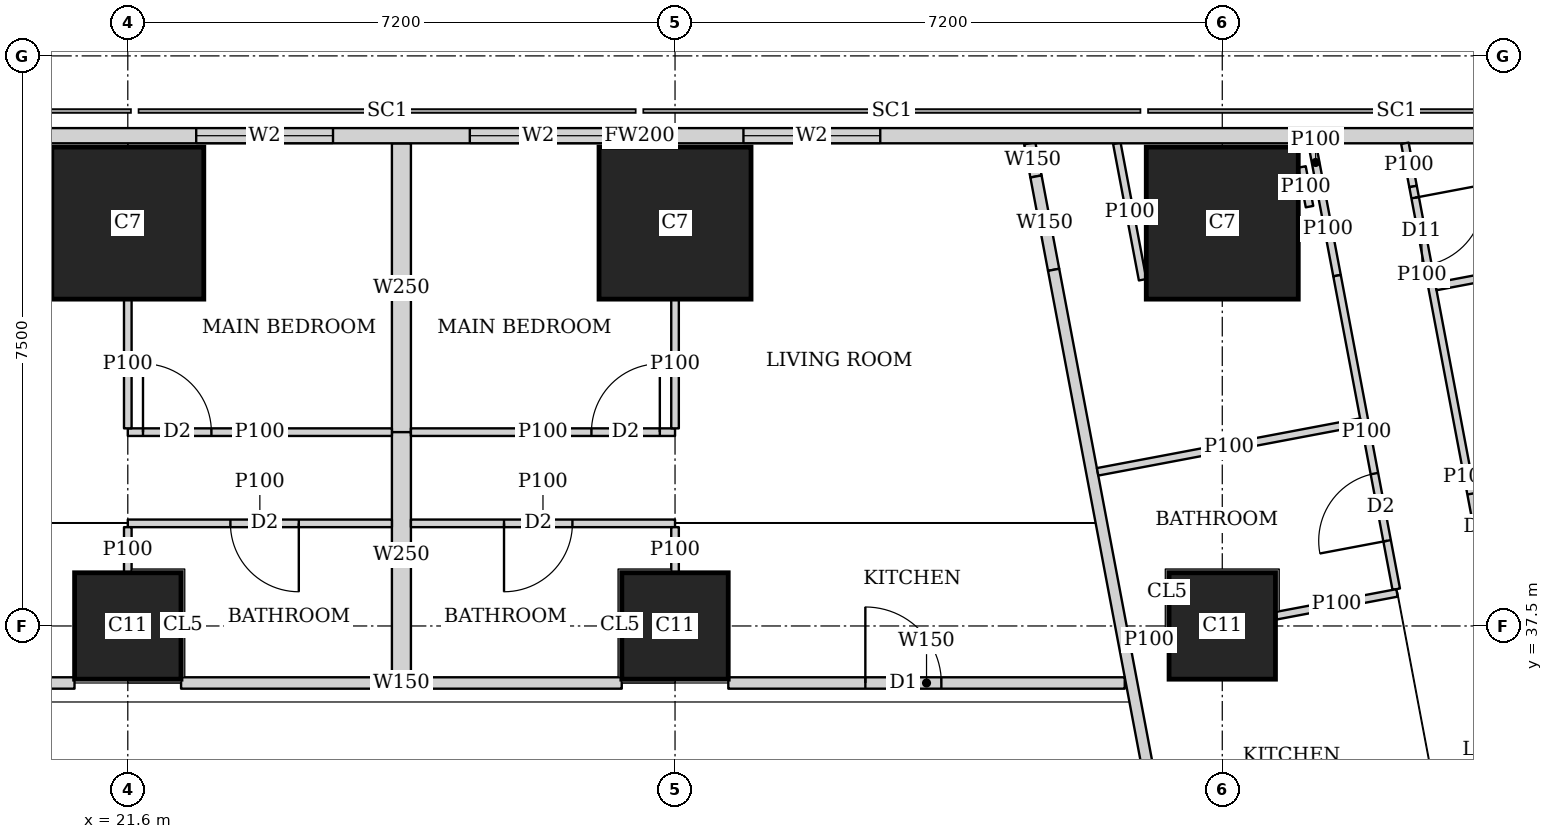
"""IFC4 building model, lengths in metres.
Left out: names, types, materials, properties, quantities, classifications, styles, units other than length and angle.
Written with IfcOpenShell. Run it as: python <this file> out.ifc"""

import sys

from ifc_helpers import new_model, si_unit, direction, frame, frame_2d, origin, origin_2d, place, context, subcontext, project, spatial, rectangle, extrude, element, fill, save


model = new_model("IFC4")
c1 = context("Model", 3, precision=1e-05, world=origin(), true_north=direction((0.0, 1.0)))
c2 = subcontext(c1, "Body", "Model", "MODEL_VIEW")
j1 = project(units=[si_unit("LENGTHUNIT", "METRE"), si_unit("PLANEANGLEUNIT", "RADIAN")], contexts=[c1])
p1 = place(None, origin())
s1 = spatial("IfcSite", under=j1, at=p1, CompositionType="ELEMENT")
p2 = place(p1, origin())
s2 = spatial("IfcBuilding", under=s1, at=p2, CompositionType="ELEMENT")
p3 = place(p2, frame((0.0, 0.0, 259.1)))
s3 = spatial("IfcBuildingStorey", under=s2, at=p3, CompositionType="ELEMENT", Elevation=259.1)
for number, where, z_axis, x_axis in (
    (1, (21.6, 37.5, 0.0), (0.0, 0.0, 1.0), (1.0, 0.0, 0.0)),
    (2, (28.8, 37.5, 0.0), (0.0, 0.0, 1.0), (1.0, 0.0, 0.0)),
    (3, (36.0, 37.5, 0.0), (0.0, 0.0, 1.0), (1.0, 0.0, 0.0)),
):
    element("IfcColumn", number, at=place(p3, frame(where, z_axis=z_axis, x_axis=x_axis)), inside=s3, PredefinedType="COLUMN", context=c2, shape_type="SweptSolid", body=[
        extrude(rectangle(XDim=1.4, YDim=1.4, at=origin_2d()), origin(), (0.0, 0.0, 1.0), 3.75),
    ])
for number, where, z_axis, x_axis in (
    (4, (21.6, 42.8, 0.0), (0.0, 0.0, 1.0), (1.0, 0.0, 0.0)),
    (5, (28.8, 42.8, 0.0), (0.0, 0.0, 1.0), (1.0, 0.0, 0.0)),
    (6, (36.0, 42.8, 0.0), (0.0, 0.0, 1.0), (1.0, 0.0, 0.0)),
):
    element("IfcColumn", number, at=place(p3, frame(where, z_axis=z_axis, x_axis=x_axis)), inside=s3, PredefinedType="COLUMN", context=c2, shape_type="SweptSolid", body=[
        extrude(rectangle(XDim=2.0, YDim=2.0, at=origin_2d()), origin(), (0.0, 0.0, 1.0), 3.75),
    ])
p4 = place(p3, frame((42.103, 43.95, 0.0), z_axis=(0.0, 0.0, 1.0), x_axis=(-1.0, 0.0, 0.0)))
e7 = element("IfcWall", 7, at=p4, inside=s3, PredefinedType="SOLIDWALL", context=c2, shape_type="SweptSolid", body=[
    extrude(rectangle(XDim=27.54, YDim=0.2, at=frame_2d((13.77, 0.0))), origin(), (0.0, 0.0, 1.0), 3.5),
])
p5 = place(p4, frame((10.603, 0.0, 0.9)))
e8 = element("IfcOpeningElement", 8, at=p5, cuts=e7, PredefinedType="OPENING", context=c2, shape_type="SweptSolid", body=[
    extrude(rectangle(XDim=1.8, YDim=1.5, at=frame_2d((0.9, 0.75))), frame((0.0, 0.11, 0.0), z_axis=(0.0, -1.0, 0.0), x_axis=(1.0, 0.0, 0.0)), (0.0, 0.0, 1.0), 0.22),
])
p6 = place(p4, frame((14.203, 0.0, 0.9)))
e9 = element("IfcOpeningElement", 9, at=p6, cuts=e7, PredefinedType="OPENING", context=c2, shape_type="SweptSolid", body=[
    extrude(rectangle(XDim=1.8, YDim=1.5, at=frame_2d((0.9, 0.75))), frame((0.0, 0.11, 0.0), z_axis=(0.0, -1.0, 0.0), x_axis=(1.0, 0.0, 0.0)), (0.0, 0.0, 1.0), 0.22),
])
p7 = place(p4, frame((17.803, 0.0, 0.9)))
e10 = element("IfcOpeningElement", 10, at=p7, cuts=e7, PredefinedType="OPENING", context=c2, shape_type="SweptSolid", body=[
    extrude(rectangle(XDim=1.8, YDim=1.5, at=frame_2d((0.9, 0.75))), frame((0.0, 0.11, 0.0), z_axis=(0.0, -1.0, 0.0), x_axis=(1.0, 0.0, 0.0)), (0.0, 0.0, 1.0), 0.22),
])
p8 = place(p4, frame((22.822, 0.0, 0.9)))
e11 = element("IfcOpeningElement", 11, at=p8, cuts=e7, PredefinedType="OPENING", context=c2, shape_type="SweptSolid", body=[
    extrude(rectangle(XDim=2.4, YDim=1.5, at=frame_2d((1.2, 0.75))), frame((0.0, 0.11, 0.0), z_axis=(0.0, -1.0, 0.0), x_axis=(1.0, 0.0, 0.0)), (0.0, 0.0, 1.0), 0.22),
])
p9 = place(p3, frame((16.001, 36.75, 0.0), z_axis=(0.0, 0.0, 1.0), x_axis=(1.0, 0.0, 0.0)))
e12 = element("IfcWall", 12, at=p9, inside=s3, PredefinedType="SOLIDWALL", context=c2, shape_type="SweptSolid", body=[
    extrude(rectangle(XDim=4.898, YDim=0.15, at=frame_2d((2.449, 0.0))), origin(), (0.0, 0.0, 1.0), 3.5),
])
p10 = place(p9, frame((1.074, 0.0, 0.0)))
e13 = element("IfcOpeningElement", 13, at=p10, cuts=e12, PredefinedType="OPENING", context=c2, shape_type="SweptSolid", body=[
    extrude(rectangle(XDim=1.0, YDim=2.1, at=frame_2d((0.5, 1.05))), frame((0.0, 0.085, 0.0), z_axis=(0.0, -1.0, 0.0), x_axis=(1.0, 0.0, 0.0)), (0.0, 0.0, 1.0), 0.17),
])
p11 = place(p3, frame((22.301, 36.75, 0.0), z_axis=(0.0, 0.0, 1.0), x_axis=(1.0, 0.0, 0.0)))
e14 = element("IfcWall", 14, at=p11, inside=s3, PredefinedType="SOLIDWALL", context=c2, shape_type="SweptSolid", body=[
    extrude(rectangle(XDim=5.798, YDim=0.15, at=frame_2d((2.899, 0.0))), origin(), (0.0, 0.0, 1.0), 3.5),
])
p12 = place(p3, frame((29.501, 36.75, 0.0), z_axis=(0.0, 0.0, 1.0), x_axis=(1.0, 0.0, 0.0)))
e15 = element("IfcWall", 15, at=p12, inside=s3, PredefinedType="SOLIDWALL", context=c2, shape_type="SweptSolid", body=[
    extrude(rectangle(XDim=5.216, YDim=0.15, at=frame_2d((2.608, 0.0))), origin(), (0.0, 0.0, 1.0), 3.5),
])
p13 = place(p12, frame((1.803, 0.0, 0.0)))
e16 = element("IfcOpeningElement", 16, at=p13, cuts=e15, PredefinedType="OPENING", context=c2, shape_type="SweptSolid", body=[
    extrude(rectangle(XDim=1.0, YDim=2.1, at=frame_2d((0.5, 1.05))), frame((0.0, 0.085, 0.0), z_axis=(0.0, -1.0, 0.0), x_axis=(1.0, 0.0, 0.0)), (0.0, 0.0, 1.0), 0.17),
])
p14 = place(p3, frame((33.467, 43.85, 0.0), z_axis=(0.0, 0.0, 1.0), x_axis=(0.184886516626, -0.982759877066, 0.0)))
e17 = element("IfcWall", 17, at=p14, inside=s3, PredefinedType="SOLIDWALL", context=c2, shape_type="SweptSolid", body=[
    extrude(rectangle(XDim=0.444, YDim=0.15, at=frame_2d((0.222, 0.0))), origin(), (0.0, 0.0, 1.0), 3.5),
])
p15 = place(p3, frame((33.549, 43.414, 0.0), z_axis=(0.0, 0.0, 1.0), x_axis=(0.185585816539, -0.982628060204, 0.0)))
e18 = element("IfcWall", 18, at=p15, inside=s3, PredefinedType="SOLIDWALL", context=c2, shape_type="SweptSolid", body=[
    extrude(rectangle(XDim=1.25, YDim=0.15, at=frame_2d((0.625, 0.0))), origin(), (0.0, 0.0, 1.0), 2.05),
])
p16 = place(p3, frame((33.781, 42.186, 0.0), z_axis=(0.0, 0.0, 1.0), x_axis=(0.185593518645, -0.9826266055, 0.0)))
e19 = element("IfcWall", 19, at=p16, inside=s3, PredefinedType="SOLIDWALL", context=c2, shape_type="SweptSolid", body=[
    extrude(rectangle(XDim=35.961, YDim=0.15, at=frame_2d((17.98, 0.0))), origin(), (0.0, 0.0, 1.0), 2.5),
])
p17 = place(p16, frame((7.183, 0.0, 0.0)))
e20 = element("IfcOpeningElement", 20, at=p17, cuts=e19, PredefinedType="OPENING", context=c2, shape_type="SweptSolid", body=[
    extrude(rectangle(XDim=1.0, YDim=2.1, at=frame_2d((0.5, 1.05))), frame((0.0, 0.085, 0.0), z_axis=(0.0, -1.0, 0.0), x_axis=(1.0, 0.0, 0.0)), (0.0, 0.0, 1.0), 0.17),
])
p18 = place(p16, frame((11.76, 0.0, 0.0)))
e21 = element("IfcOpeningElement", 21, at=p18, cuts=e19, PredefinedType="OPENING", context=c2, shape_type="SweptSolid", body=[
    extrude(rectangle(XDim=1.0, YDim=2.1, at=frame_2d((0.5, 1.05))), frame((0.0, 0.085, 0.0), z_axis=(0.0, -1.0, 0.0), x_axis=(1.0, 0.0, 0.0)), (0.0, 0.0, 1.0), 0.17),
])
p19 = place(p16, frame((23.863, 0.0, 0.0)))
e22 = element("IfcOpeningElement", 22, at=p19, cuts=e19, PredefinedType="OPENING", context=c2, shape_type="SweptSolid", body=[
    extrude(rectangle(XDim=1.0, YDim=2.1, at=frame_2d((0.5, 1.05))), frame((0.0, 0.085, 0.0), z_axis=(0.0, -1.0, 0.0), x_axis=(1.0, 0.0, 0.0)), (0.0, 0.0, 1.0), 0.17),
])
p20 = place(p16, frame((30.502, 0.0, 0.0)))
e23 = element("IfcOpeningElement", 23, at=p20, cuts=e19, PredefinedType="OPENING", context=c2, shape_type="SweptSolid", body=[
    extrude(rectangle(XDim=1.0, YDim=2.1, at=frame_2d((0.5, 1.05))), frame((0.0, 0.085, 0.0), z_axis=(0.0, -1.0, 0.0), x_axis=(1.0, 0.0, 0.0)), (0.0, 0.0, 1.0), 0.17),
])
p21 = place(p3, frame((34.952, 42.055, 0.0), z_axis=(0.0, 0.0, 1.0), x_axis=(-0.185490642006, 0.98264603074, 0.0)))
e24 = element("IfcWall", 24, at=p21, inside=s3, PredefinedType="PARTITIONING", context=c2, shape_type="SweptSolid", body=[
    extrude(rectangle(XDim=1.827, YDim=0.1, at=frame_2d((0.914, 0.0))), origin(), (0.0, 0.0, 1.0), 2.05),
])
p22 = place(p3, frame((37.049, 43.539, 0.0), z_axis=(0.0, 0.0, 1.0), x_axis=(0.186119495745, -0.982527115811, 0.0)))
e25 = element("IfcWall", 25, at=p22, inside=s3, PredefinedType="PARTITIONING", context=c2, shape_type="SweptSolid", body=[
    extrude(rectangle(XDim=0.531, YDim=0.1, at=frame_2d((0.266, 0.0))), origin(), (0.0, 0.0, 1.0), 2.05),
])
p23 = place(p3, frame((38.403, 43.85, 0.0), z_axis=(0.0, 0.0, 1.0), x_axis=(0.184976954078, -0.982742858768, 0.0)))
e26 = element("IfcWall", 26, at=p23, inside=s3, PredefinedType="PARTITIONING", context=c2, shape_type="SweptSolid", body=[
    extrude(rectangle(XDim=0.578, YDim=0.1, at=frame_2d((0.289, 0.0))), origin(), (0.0, 0.0, 1.0), 3.5),
])
p24 = place(p3, frame((38.51, 43.282, 0.0), z_axis=(0.0, 0.0, 1.0), x_axis=(0.185775287495, -0.982592256511, 0.0)))
e27 = element("IfcWall", 27, at=p24, inside=s3, PredefinedType="PARTITIONING", context=c2, shape_type="SweptSolid", body=[
    extrude(rectangle(XDim=1.259, YDim=0.1, at=frame_2d((0.629, 0.0))), origin(), (0.0, 0.0, 1.0), 2.05),
])
p25 = place(p24, frame((0.15, 0.0, 0.0)))
e28 = element("IfcOpeningElement", 28, at=p25, cuts=e27, PredefinedType="OPENING", context=c2, shape_type="SweptSolid", body=[
    extrude(rectangle(XDim=0.9, YDim=2.0, at=frame_2d((0.45, 1.0))), frame((0.0, 0.06, 0.0), z_axis=(0.0, -1.0, 0.0), x_axis=(1.0, 0.0, 0.0)), (0.0, 0.0, 1.0), 0.12),
])
p26 = place(p3, frame((38.744, 42.045, 0.0), z_axis=(0.0, 0.0, 1.0), x_axis=(0.185564988614, -0.982631993679, 0.0)))
e29 = element("IfcWall", 29, at=p26, inside=s3, PredefinedType="PARTITIONING", context=c2, shape_type="SweptSolid", body=[
    extrude(rectangle(XDim=5.265, YDim=0.1, at=frame_2d((2.633, 0.0))), origin(), (0.0, 0.0, 1.0), 3.5),
])
p27 = place(p26, frame((2.856, 0.0, 0.0)))
e30 = element("IfcOpeningElement", 30, at=p27, cuts=e29, PredefinedType="OPENING", context=c2, shape_type="SweptSolid", body=[
    extrude(rectangle(XDim=0.9, YDim=2.1, at=frame_2d((0.45, 1.05))), frame((0.0, 0.06, 0.0), z_axis=(0.0, -1.0, 0.0), x_axis=(1.0, 0.0, 0.0)), (0.0, 0.0, 1.0), 0.12),
])
p28 = place(p3, frame((37.181, 43.85, 0.0), z_axis=(0.0, 0.0, 1.0), x_axis=(0.185121727606, -0.982715597703, 0.0)))
e31 = element("IfcWall", 31, at=p28, inside=s3, PredefinedType="PARTITIONING", context=c2, shape_type="SweptSolid", body=[
    extrude(rectangle(XDim=0.513, YDim=0.1, at=frame_2d((0.256, 0.0))), origin(), (0.0, 0.0, 1.0), 3.5),
])
p29 = place(p3, frame((37.276, 43.346, 0.0), z_axis=(0.0, 0.0, 1.0), x_axis=(0.185962504646, -0.982556841544, 0.0)))
e32 = element("IfcWall", 32, at=p29, inside=s3, PredefinedType="PARTITIONING", context=c2, shape_type="SweptSolid", body=[
    extrude(rectangle(XDim=1.259, YDim=0.1, at=frame_2d((0.629, 0.0))), origin(), (0.0, 0.0, 1.0), 2.05),
])
p30 = place(p3, frame((37.51, 42.109, 0.0), z_axis=(0.0, 0.0, 1.0), x_axis=(0.185580569503, -0.98262905118, 0.0)))
e33 = element("IfcWall", 33, at=p30, inside=s3, PredefinedType="PARTITIONING", context=c2, shape_type="SweptSolid", body=[
    extrude(rectangle(XDim=4.198, YDim=0.1, at=frame_2d((2.099, 0.0))), origin(), (0.0, 0.0, 1.0), 3.5),
])
p31 = place(p30, frame((2.65, 0.0, 0.0)))
e34 = element("IfcOpeningElement", 34, at=p31, cuts=e33, PredefinedType="OPENING", context=c2, shape_type="SweptSolid", body=[
    extrude(rectangle(XDim=0.9, YDim=2.1, at=frame_2d((0.45, 1.05))), frame((0.0, 0.06, 0.0), z_axis=(0.0, -1.0, 0.0), x_axis=(1.0, 0.0, 0.0)), (0.0, 0.0, 1.0), 0.12),
])
p32 = place(p3, frame((40.657, 42.315, 0.0), z_axis=(0.0, 0.0, 1.0), x_axis=(-0.982622785543, -0.185613742305, 0.0)))
e35 = element("IfcWall", 35, at=p32, inside=s3, PredefinedType="PARTITIONING", context=c2, shape_type="SweptSolid", body=[
    extrude(rectangle(XDim=1.88, YDim=0.1, at=frame_2d((0.94, 0.0))), origin(), (0.0, 0.0, 1.0), 2.05),
])
p33 = place(p3, frame((37.823, 40.182, 0.0), z_axis=(0.0, 0.0, 1.0), x_axis=(-0.98263926043, -0.185526504472, 0.0)))
e36 = element("IfcWall", 36, at=p33, inside=s3, PredefinedType="PARTITIONING", context=c2, shape_type="SweptSolid", body=[
    extrude(rectangle(XDim=3.524, YDim=0.1, at=frame_2d((1.762, 0.0))), origin(), (0.0, 0.0, 1.0), 3.5),
])
p34 = place(p3, frame((38.299, 37.935, 0.0), z_axis=(0.0, 0.0, 1.0), x_axis=(-0.98263725405, -0.185537130931, 0.0)))
e37 = element("IfcWall", 37, at=p34, inside=s3, PredefinedType="PARTITIONING", context=c2, shape_type="SweptSolid", body=[
    extrude(rectangle(XDim=1.617, YDim=0.1, at=frame_2d((0.809, 0.0))), origin(), (0.0, 0.0, 1.0), 3.5),
])
p35 = place(p3, frame((35.29, 37.366, 0.0), z_axis=(0.0, 0.0, 1.0), x_axis=(-0.982715597703, -0.185121727606, 0.0)))
e38 = element("IfcWall", 38, at=p35, inside=s3, PredefinedType="PARTITIONING", context=c2, shape_type="SweptSolid", body=[
    extrude(rectangle(XDim=0.513, YDim=0.1, at=frame_2d((0.256, 0.0))), origin(), (0.0, 0.0, 1.0), 3.5),
])
p36 = place(p3, frame((21.6, 40.05, 0.0), z_axis=(0.0, 0.0, 1.0), x_axis=(1.0, 0.0, 0.0)))
e39 = element("IfcWall", 39, at=p36, inside=s3, PredefinedType="PARTITIONING", context=c2, shape_type="SweptSolid", body=[
    extrude(rectangle(XDim=3.475, YDim=0.1, at=frame_2d((1.737, 0.0))), origin(), (0.0, 0.0, 1.0), 3.5),
])
p37 = place(p36, frame((0.2, 0.0, 0.0)))
e40 = element("IfcOpeningElement", 40, at=p37, cuts=e39, PredefinedType="OPENING", context=c2, shape_type="SweptSolid", body=[
    extrude(rectangle(XDim=0.9, YDim=2.1, at=frame_2d((0.45, 1.05))), frame((0.0, 0.06, 0.0), z_axis=(0.0, -1.0, 0.0), x_axis=(1.0, 0.0, 0.0)), (0.0, 0.0, 1.0), 0.12),
])
p38 = place(p3, frame((21.6, 38.85, 0.0), z_axis=(0.0, 0.0, 1.0), x_axis=(1.0, 0.0, 0.0)))
e41 = element("IfcWall", 41, at=p38, inside=s3, PredefinedType="PARTITIONING", context=c2, shape_type="SweptSolid", body=[
    extrude(rectangle(XDim=3.475, YDim=0.1, at=frame_2d((1.737, 0.0))), origin(), (0.0, 0.0, 1.0), 3.5),
])
p39 = place(p38, frame((1.35, 0.0, 0.0)))
e42 = element("IfcOpeningElement", 42, at=p39, cuts=e41, PredefinedType="OPENING", context=c2, shape_type="SweptSolid", body=[
    extrude(rectangle(XDim=0.9, YDim=2.1, at=frame_2d((0.45, 1.05))), frame((0.0, 0.06, 0.0), z_axis=(0.0, -1.0, 0.0), x_axis=(1.0, 0.0, 0.0)), (0.0, 0.0, 1.0), 0.12),
])
p40 = place(p3, frame((21.6, 40.1, 0.0), z_axis=(0.0, 0.0, 1.0), x_axis=(0.0, 1.0, 0.0)))
e43 = element("IfcWall", 43, at=p40, inside=s3, PredefinedType="PARTITIONING", context=c2, shape_type="SweptSolid", body=[
    extrude(rectangle(XDim=1.699, YDim=0.1, at=frame_2d((0.85, 0.0))), origin(), (0.0, 0.0, 1.0), 3.5),
])
p41 = place(p3, frame((21.6, 38.201, 0.0), z_axis=(0.0, 0.0, 1.0), x_axis=(0.0, 1.0, 0.0)))
e44 = element("IfcWall", 44, at=p41, inside=s3, PredefinedType="PARTITIONING", context=c2, shape_type="SweptSolid", body=[
    extrude(rectangle(XDim=0.599, YDim=0.1, at=frame_2d((0.3, 0.0))), origin(), (0.0, 0.0, 1.0), 3.5),
])
p42 = place(p3, frame((25.325, 40.05, 0.0), z_axis=(0.0, 0.0, 1.0), x_axis=(1.0, 0.0, 0.0)))
e45 = element("IfcWall", 45, at=p42, inside=s3, PredefinedType="PARTITIONING", context=c2, shape_type="SweptSolid", body=[
    extrude(rectangle(XDim=3.475, YDim=0.1, at=frame_2d((1.738, 0.0))), origin(), (0.0, 0.0, 1.0), 3.5),
])
p43 = place(p42, frame((2.375, 0.0, 0.0)))
e46 = element("IfcOpeningElement", 46, at=p43, cuts=e45, PredefinedType="OPENING", context=c2, shape_type="SweptSolid", body=[
    extrude(rectangle(XDim=0.9, YDim=2.1, at=frame_2d((0.45, 1.05))), frame((0.0, 0.06, 0.0), z_axis=(0.0, -1.0, 0.0), x_axis=(1.0, 0.0, 0.0)), (0.0, 0.0, 1.0), 0.12),
])
p44 = place(p3, frame((25.325, 38.85, 0.0), z_axis=(0.0, 0.0, 1.0), x_axis=(1.0, 0.0, 0.0)))
e47 = element("IfcWall", 47, at=p44, inside=s3, PredefinedType="PARTITIONING", context=c2, shape_type="SweptSolid", body=[
    extrude(rectangle(XDim=3.475, YDim=0.1, at=frame_2d((1.738, 0.0))), origin(), (0.0, 0.0, 1.0), 3.5),
])
p45 = place(p44, frame((1.225, 0.0, 0.0)))
e48 = element("IfcOpeningElement", 48, at=p45, cuts=e47, PredefinedType="OPENING", context=c2, shape_type="SweptSolid", body=[
    extrude(rectangle(XDim=0.9, YDim=2.1, at=frame_2d((0.45, 1.05))), frame((0.0, 0.06, 0.0), z_axis=(0.0, -1.0, 0.0), x_axis=(1.0, 0.0, 0.0)), (0.0, 0.0, 1.0), 0.12),
])
p46 = place(p3, frame((28.8, 40.1, 0.0), z_axis=(0.0, 0.0, 1.0), x_axis=(0.0, 1.0, 0.0)))
e49 = element("IfcWall", 49, at=p46, inside=s3, PredefinedType="PARTITIONING", context=c2, shape_type="SweptSolid", body=[
    extrude(rectangle(XDim=1.699, YDim=0.1, at=frame_2d((0.85, 0.0))), origin(), (0.0, 0.0, 1.0), 3.5),
])
p47 = place(p3, frame((28.8, 38.201, 0.0), z_axis=(0.0, 0.0, 1.0), x_axis=(0.0, 1.0, 0.0)))
e50 = element("IfcWall", 50, at=p47, inside=s3, PredefinedType="PARTITIONING", context=c2, shape_type="SweptSolid", body=[
    extrude(rectangle(XDim=0.599, YDim=0.1, at=frame_2d((0.3, 0.0))), origin(), (0.0, 0.0, 1.0), 3.5),
])
p48 = place(p3, frame((25.2, 40.05, 0.0), z_axis=(0.0, 0.0, 1.0), x_axis=(0.0, 1.0, 0.0)))
e51 = element("IfcWall", 51, at=p48, inside=s3, PredefinedType="SOLIDWALL", context=c2, shape_type="SweptSolid", body=[
    extrude(rectangle(XDim=3.8, YDim=0.25, at=frame_2d((1.9, 0.0))), origin(), (0.0, 0.0, 1.0), 2.05),
])
p49 = place(p3, frame((25.2, 36.825, 0.0), z_axis=(0.0, 0.0, 1.0), x_axis=(0.0, 1.0, 0.0)))
e52 = element("IfcWall", 52, at=p49, inside=s3, PredefinedType="SOLIDWALL", context=c2, shape_type="SweptSolid", body=[
    extrude(rectangle(XDim=3.225, YDim=0.25, at=frame_2d((1.613, 0.0))), origin(), (0.0, 0.0, 1.0), 3.5),
])
p50 = place(p5, origin())
e53 = element("IfcWindow", 53, at=p50, inside=s3, PartitioningType="SINGLE_PANEL", PredefinedType="WINDOW", context=c2, shape_type="SweptSolid", body=[
    extrude(rectangle(XDim=1.8, YDim=1.5, at=frame_2d((0.9, 0.75))), frame((0.0, 0.03, 0.0), z_axis=(0.0, -1.0, 0.0), x_axis=(1.0, 0.0, 0.0)), (0.0, 0.0, 1.0), 0.06),
])
fill(e8, e53)
p51 = place(p6, origin())
e54 = element("IfcWindow", 54, at=p51, inside=s3, PartitioningType="SINGLE_PANEL", PredefinedType="WINDOW", context=c2, shape_type="SweptSolid", body=[
    extrude(rectangle(XDim=1.8, YDim=1.5, at=frame_2d((0.9, 0.75))), frame((0.0, 0.03, 0.0), z_axis=(0.0, -1.0, 0.0), x_axis=(1.0, 0.0, 0.0)), (0.0, 0.0, 1.0), 0.06),
])
fill(e9, e54)
p52 = place(p7, origin())
e55 = element("IfcWindow", 55, at=p52, inside=s3, PartitioningType="SINGLE_PANEL", PredefinedType="WINDOW", context=c2, shape_type="SweptSolid", body=[
    extrude(rectangle(XDim=1.8, YDim=1.5, at=frame_2d((0.9, 0.75))), frame((0.0, 0.03, 0.0), z_axis=(0.0, -1.0, 0.0), x_axis=(1.0, 0.0, 0.0)), (0.0, 0.0, 1.0), 0.06),
])
fill(e10, e55)
p53 = place(p25, origin())
e56 = element("IfcDoor", 56, at=p53, inside=s3, OperationType="SINGLE_SWING_LEFT", PredefinedType="DOOR", context=c2, shape_type="SweptSolid", body=[
    extrude(rectangle(XDim=0.9, YDim=2.0, at=frame_2d((0.45, 1.0))), frame((0.0, 0.025, 0.0), z_axis=(0.0, -1.0, 0.0), x_axis=(1.0, 0.0, 0.0)), (0.0, 0.0, 1.0), 0.05),
])
fill(e28, e56)
p54 = place(p27, origin())
e57 = element("IfcDoor", 57, at=p54, inside=s3, OperationType="SINGLE_SWING_RIGHT", PredefinedType="DOOR", context=c2, shape_type="SweptSolid", body=[
    extrude(rectangle(XDim=0.9, YDim=2.1, at=frame_2d((0.45, 1.05))), frame((0.0, 0.025, 0.0), z_axis=(0.0, -1.0, 0.0), x_axis=(1.0, 0.0, 0.0)), (0.0, 0.0, 1.0), 0.05),
])
fill(e30, e57)
p55 = place(p31, origin())
e58 = element("IfcDoor", 58, at=p55, inside=s3, OperationType="SINGLE_SWING_LEFT", PredefinedType="DOOR", context=c2, shape_type="SweptSolid", body=[
    extrude(rectangle(XDim=0.9, YDim=2.1, at=frame_2d((0.45, 1.05))), frame((0.0, 0.025, 0.0), z_axis=(0.0, -1.0, 0.0), x_axis=(1.0, 0.0, 0.0)), (0.0, 0.0, 1.0), 0.05),
])
fill(e34, e58)
p56 = place(p37, origin())
e59 = element("IfcDoor", 59, at=p56, inside=s3, OperationType="SINGLE_SWING_LEFT", PredefinedType="DOOR", context=c2, shape_type="SweptSolid", body=[
    extrude(rectangle(XDim=0.9, YDim=2.1, at=frame_2d((0.45, 1.05))), frame((0.0, 0.025, 0.0), z_axis=(0.0, -1.0, 0.0), x_axis=(1.0, 0.0, 0.0)), (0.0, 0.0, 1.0), 0.05),
])
fill(e40, e59)
p57 = place(p39, origin())
e60 = element("IfcDoor", 60, at=p57, inside=s3, OperationType="SINGLE_SWING_LEFT", PredefinedType="DOOR", context=c2, shape_type="SweptSolid", body=[
    extrude(rectangle(XDim=0.9, YDim=2.1, at=frame_2d((0.45, 1.05))), frame((0.0, 0.025, 0.0), z_axis=(0.0, -1.0, 0.0), x_axis=(1.0, 0.0, 0.0)), (0.0, 0.0, 1.0), 0.05),
])
fill(e42, e60)
p58 = place(p43, origin())
e61 = element("IfcDoor", 61, at=p58, inside=s3, OperationType="SINGLE_SWING_RIGHT", PredefinedType="DOOR", context=c2, shape_type="SweptSolid", body=[
    extrude(rectangle(XDim=0.9, YDim=2.1, at=frame_2d((0.45, 1.05))), frame((0.0, 0.025, 0.0), z_axis=(0.0, -1.0, 0.0), x_axis=(1.0, 0.0, 0.0)), (0.0, 0.0, 1.0), 0.05),
])
fill(e46, e61)
p59 = place(p45, origin())
e62 = element("IfcDoor", 62, at=p59, inside=s3, OperationType="SINGLE_SWING_RIGHT", PredefinedType="DOOR", context=c2, shape_type="SweptSolid", body=[
    extrude(rectangle(XDim=0.9, YDim=2.1, at=frame_2d((0.45, 1.05))), frame((0.0, 0.025, 0.0), z_axis=(0.0, -1.0, 0.0), x_axis=(1.0, 0.0, 0.0)), (0.0, 0.0, 1.0), 0.05),
])
fill(e48, e62)
p60 = place(p13, origin())
e63 = element("IfcDoor", 63, at=p60, inside=s3, OperationType="SINGLE_SWING_LEFT", PredefinedType="DOOR", context=c2, shape_type="SweptSolid", body=[
    extrude(rectangle(XDim=1.0, YDim=2.1, at=frame_2d((0.5, 1.05))), frame((0.0, 0.025, 0.0), z_axis=(0.0, -1.0, 0.0), x_axis=(1.0, 0.0, 0.0)), (0.0, 0.0, 1.0), 0.05),
])
fill(e16, e63)
save(model, sys.argv[1])
